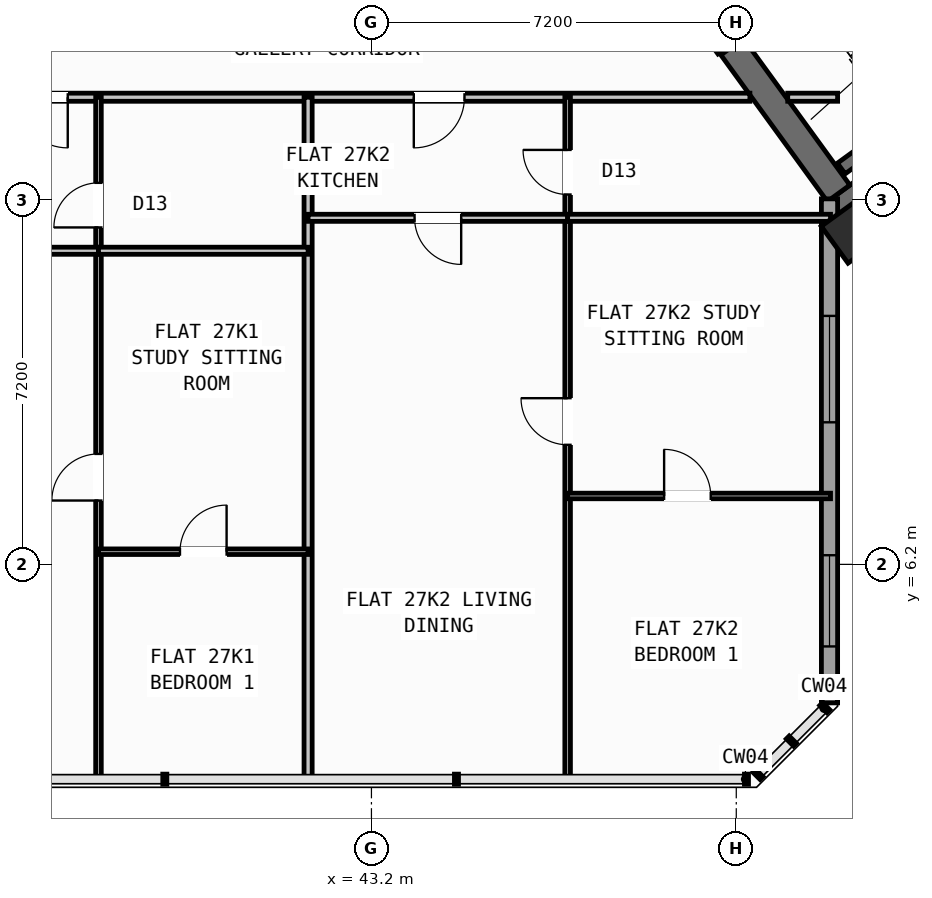
"""IFC4 building model, lengths in metres.
Left out: names, types, materials, properties, quantities, classifications, styles, units other than length and angle.
Written with IfcOpenShell. Run it as: python <this file> out.ifc"""

import sys

from ifc_helpers import new_model, si_unit, direction, frame, frame_2d, origin, origin_2d, place, context, subcontext, project, spatial, rectangle, hollow_rectangle, extrude, source, transform, mapped, element, fill, save


model = new_model("IFC4")
c1 = context("Model", 3, precision=1e-05, world=origin(), true_north=direction((0.0, 1.0)))
c2 = subcontext(c1, "Body", "Model", "MODEL_VIEW")
j1 = project(units=[si_unit("LENGTHUNIT", "METRE"), si_unit("PLANEANGLEUNIT", "RADIAN")], contexts=[c1])
p1 = place(None, origin())
s1 = spatial("IfcSite", under=j1, at=p1, CompositionType="ELEMENT")
p2 = place(p1, origin())
s2 = spatial("IfcBuilding", under=s1, at=p2, CompositionType="ELEMENT")
p3 = place(p2, frame((0.0, 0.0, 108.9)))
s3 = spatial("IfcBuildingStorey", under=s2, at=p3, CompositionType="ELEMENT", Elevation=108.9)
p4 = place(p3, frame((36.683, 18.304, 0.0), z_axis=(0.0, 0.0, 1.0), x_axis=(-0.529896466841, -0.848062341122, 0.0)))
e1 = element("IfcWall", 1, at=p4, inside=s3, PredefinedType="SHEAR", context=c2, shape_type="SweptSolid", body=[
    extrude(rectangle(XDim=6.425, YDim=0.55, at=frame_2d((3.212, 0.0))), origin(), (0.0, 0.0, 1.0), 3.35),
])
p5 = place(p3, frame((52.359, 13.14, 0.0), z_axis=(0.0, 0.0, 1.0), x_axis=(0.809014896919, 0.587788139183, 0.0)))
e2 = element("IfcWall", 2, at=p5, inside=s3, PredefinedType="SHEAR", context=c2, shape_type="SweptSolid", body=[
    extrude(rectangle(XDim=12.34, YDim=0.55, at=frame_2d((6.17, 0.0))), origin(), (0.0, 0.0, 1.0), 3.35),
])
p6 = place(p3, frame((52.42, 13.524, 0.0), z_axis=(0.0, 0.0, 1.0), x_axis=(-0.587802113096, 0.809004744015, 0.0)))
e3 = element("IfcWall", 3, at=p6, inside=s3, PredefinedType="SHEAR", context=c2, shape_type="SweptSolid", body=[
    extrude(rectangle(XDim=3.575, YDim=0.55, at=frame_2d((1.788, 0.0))), origin(), (0.0, 0.0, 1.0), 3.35),
])
m1 = source(origin(), c2, "Body", "SweptSolid", [
    extrude(hollow_rectangle(XDim=0.9, YDim=0.9, WallThickness=0.036, at=origin_2d()), origin(), (0.0, 0.0, 1.0), 3.6),
])
p7 = place(p3, frame((52.705, 12.773, 0.0), z_axis=(0.0, 0.0, 1.0), x_axis=(0.809016994375, 0.587785252292, 0.0)))
e4 = element("IfcColumn", 4, at=p7, inside=s3, PredefinedType="COLUMN", context=c2, shape_type="MappedRepresentation", body=[
    mapped(m1, transform((0.0, 0.0, 0.0), scale=1.0)),
])
p8 = place(p3, frame((52.24, 13.414, 0.0), z_axis=(0.0, 0.0, 1.0), x_axis=(0.0, -1.0, 0.0)))
e5 = element("IfcWall", 5, at=p8, inside=s3, PredefinedType="STANDARD", context=c2, shape_type="SweptSolid", body=[
    extrude(rectangle(XDim=9.948, YDim=0.32, at=frame_2d((4.974, 0.0))), origin(), (0.0, 0.0, 1.0), 3.35),
])
p9 = place(p8, frame((2.31, 0.0, 0.8)))
e6 = element("IfcOpeningElement", 6, at=p9, cuts=e5, PredefinedType="OPENING", context=c2, shape_type="SweptSolid", body=[
    extrude(rectangle(XDim=2.1, YDim=1.55, at=frame_2d((1.05, 0.775))), frame((0.0, 0.17, 0.0), z_axis=(0.0, -1.0, 0.0), x_axis=(1.0, 0.0, 0.0)), (0.0, 0.0, 1.0), 0.34),
])
p10 = place(p8, frame((7.033, 0.0, 0.85)))
e7 = element("IfcOpeningElement", 7, at=p10, cuts=e5, PredefinedType="OPENING", context=c2, shape_type="SweptSolid", body=[
    extrude(rectangle(XDim=1.8, YDim=1.5, at=frame_2d((0.9, 0.75))), frame((0.0, 0.17, 0.0), z_axis=(0.0, -1.0, 0.0), x_axis=(1.0, 0.0, 0.0)), (0.0, 0.0, 1.0), 0.34),
])
p11 = place(p3, frame((52.472, 14.013, 0.0), z_axis=(0.0, 0.0, 1.0), x_axis=(0.809028366311, 0.587769599847, 0.0)))
e8 = element("IfcWall", 8, at=p11, inside=s3, PredefinedType="SHEAR", context=c2, shape_type="SweptSolid", body=[
    extrude(rectangle(XDim=7.33, YDim=0.26, at=frame_2d((3.665, 0.0))), origin(), (0.0, 0.0, 1.0), 3.35),
])
p12 = place(p3, frame((35.237, 15.42, 0.0), z_axis=(0.0, 0.0, 1.0), x_axis=(1.0, 0.0, 0.0)))
e9 = element("IfcWall", 9, at=p12, inside=s3, PredefinedType="PARTITIONING", context=c2, shape_type="SweptSolid", body=[
    extrude(rectangle(XDim=15.432, YDim=0.16, at=frame_2d((7.716, 0.0))), origin(), (0.0, 0.0, 1.0), 3.34),
])
p13 = place(p12, frame((0.969, 0.0, 0.0)))
e10 = element("IfcOpeningElement", 10, at=p13, cuts=e9, PredefinedType="OPENING", context=c2, shape_type="SweptSolid", body=[
    extrude(rectangle(XDim=1.0, YDim=2.1, at=frame_2d((0.5, 1.05))), frame((0.0, 0.09, 0.0), z_axis=(0.0, -1.0, 0.0), x_axis=(1.0, 0.0, 0.0)), (0.0, 0.0, 1.0), 0.18),
])
p14 = place(p12, frame((8.799, 0.0, 0.0)))
e11 = element("IfcOpeningElement", 11, at=p14, cuts=e9, PredefinedType="OPENING", context=c2, shape_type="SweptSolid", body=[
    extrude(rectangle(XDim=1.0, YDim=2.1, at=frame_2d((0.5, 1.05))), frame((0.0, 0.09, 0.0), z_axis=(0.0, -1.0, 0.0), x_axis=(1.0, 0.0, 0.0)), (0.0, 0.0, 1.0), 0.18),
])
p15 = place(p3, frame((51.416, 15.42, 0.0), z_axis=(0.0, 0.0, 1.0), x_axis=(1.0, 0.0, 0.0)))
e12 = element("IfcWall", 12, at=p15, inside=s3, PredefinedType="PARTITIONING", context=c2, shape_type="SweptSolid", body=[
    extrude(rectangle(XDim=0.984, YDim=0.16, at=frame_2d((0.492, 0.0))), origin(), (0.0, 0.0, 1.0), 3.34),
])
p16 = place(p3, frame((50.119, 16.333, 0.0), z_axis=(0.0, 0.0, 1.0), x_axis=(-0.587749856981, 0.809042709391, 0.0)))
e13 = element("IfcWall", 13, at=p16, inside=s3, PredefinedType="STANDARD", context=c2, shape_type="SweptSolid", body=[
    extrude(rectangle(XDim=2.96, YDim=0.2, at=frame_2d((1.48, 0.0))), origin(), (0.0, 0.0, 1.0), 3.34),
])
p17 = place(p16, frame((0.53, 0.0, 0.0)))
e14 = element("IfcOpeningElement", 14, at=p17, cuts=e13, PredefinedType="OPENING", context=c2, shape_type="SweptSolid", body=[
    extrude(rectangle(XDim=1.5, YDim=2.15, at=frame_2d((0.75, 1.075))), frame((0.0, 0.11, 0.0), z_axis=(0.0, -1.0, 0.0), x_axis=(1.0, 0.0, 0.0)), (0.0, 0.0, 1.0), 0.22),
])
p18 = place(p3, frame((41.95, 1.96, 0.0), z_axis=(0.0, 0.0, 1.0), x_axis=(0.0, 1.0, 0.0)))
e15 = element("IfcWall", 15, at=p18, inside=s3, PredefinedType="PARTITIONING", context=c2, shape_type="SweptSolid", body=[
    extrude(rectangle(XDim=13.46, YDim=0.16, at=frame_2d((6.73, 0.0))), origin(), (0.0, 0.0, 1.0), 3.34),
])
p19 = place(p3, frame((37.813, 1.96, 0.0), z_axis=(0.0, 0.0, 1.0), x_axis=(0.0, 1.0, 0.0)))
e16 = element("IfcWall", 16, at=p19, inside=s3, PredefinedType="PARTITIONING", context=c2, shape_type="SweptSolid", body=[
    extrude(rectangle(XDim=13.46, YDim=0.11, at=frame_2d((6.73, 0.0))), origin(), (0.0, 0.0, 1.0), 3.34),
])
p20 = place(p19, frame((5.5, 0.0, 0.0)))
e17 = element("IfcOpeningElement", 17, at=p20, cuts=e16, PredefinedType="OPENING", context=c2, shape_type="SweptSolid", body=[
    extrude(rectangle(XDim=0.92, YDim=2.08, at=frame_2d((0.46, 1.04))), frame((0.0, 0.065, 0.0), z_axis=(0.0, -1.0, 0.0), x_axis=(1.0, 0.0, 0.0)), (0.0, 0.0, 1.0), 0.13),
])
p21 = place(p19, frame((10.89, 0.0, 0.0)))
e18 = element("IfcOpeningElement", 18, at=p21, cuts=e16, PredefinedType="OPENING", context=c2, shape_type="SweptSolid", body=[
    extrude(rectangle(XDim=0.88, YDim=2.08, at=frame_2d((0.44, 1.04))), frame((0.0, 0.065, 0.0), z_axis=(0.0, -1.0, 0.0), x_axis=(1.0, 0.0, 0.0)), (0.0, 0.0, 1.0), 0.13),
])
p22 = place(p3, frame((33.433, 12.39, 0.0), z_axis=(0.0, 0.0, 1.0), x_axis=(1.0, 0.0, 0.0)))
e19 = element("IfcWall", 19, at=p22, inside=s3, PredefinedType="PLUMBINGWALL", context=c2, shape_type="SweptSolid", body=[
    extrude(rectangle(XDim=4.38, YDim=0.14, at=frame_2d((2.19, 0.0))), origin(), (0.0, 0.0, 1.0), 2.525),
])
p23 = place(p22, frame((1.064, 0.0, 0.0)))
e20 = element("IfcOpeningElement", 20, at=p23, cuts=e19, PredefinedType="OPENING", context=c2, shape_type="SweptSolid", body=[
    extrude(rectangle(XDim=0.92, YDim=2.08, at=frame_2d((0.46, 1.04))), frame((0.0, 0.08, 0.0), z_axis=(0.0, -1.0, 0.0), x_axis=(1.0, 0.0, 0.0)), (0.0, 0.0, 1.0), 0.16),
])
p24 = place(p3, frame((37.813, 12.39, 0.0), z_axis=(0.0, 0.0, 1.0), x_axis=(1.0, 0.0, 0.0)))
e21 = element("IfcWall", 21, at=p24, inside=s3, PredefinedType="PLUMBINGWALL", context=c2, shape_type="SweptSolid", body=[
    extrude(rectangle(XDim=4.137, YDim=0.14, at=frame_2d((2.068, 0.0))), origin(), (0.0, 0.0, 1.0), 2.525),
])
p25 = place(p3, frame((37.813, 6.45, 0.0), z_axis=(0.0, 0.0, 1.0), x_axis=(1.0, 0.0, 0.0)))
e22 = element("IfcWall", 22, at=p25, inside=s3, PredefinedType="PARTITIONING", context=c2, shape_type="SweptSolid", body=[
    extrude(rectangle(XDim=4.137, YDim=0.11, at=frame_2d((2.068, 0.0))), origin(), (0.0, 0.0, 1.0), 3.34),
])
p26 = place(p25, frame((1.608, 0.0, 0.0)))
e23 = element("IfcOpeningElement", 23, at=p26, cuts=e22, PredefinedType="OPENING", context=c2, shape_type="SweptSolid", body=[
    extrude(rectangle(XDim=0.92, YDim=2.08, at=frame_2d((0.46, 1.04))), frame((0.0, 0.065, 0.0), z_axis=(0.0, -1.0, 0.0), x_axis=(1.0, 0.0, 0.0)), (0.0, 0.0, 1.0), 0.13),
])
p27 = place(p3, frame((47.072, 1.96, 0.0), z_axis=(0.0, 0.0, 1.0), x_axis=(0.0, 1.0, 0.0)))
e24 = element("IfcWall", 24, at=p27, inside=s3, PredefinedType="PARTITIONING", context=c2, shape_type="SweptSolid", body=[
    extrude(rectangle(XDim=13.46, YDim=0.11, at=frame_2d((6.73, 0.0))), origin(), (0.0, 0.0, 1.0), 3.34),
])
p28 = place(p27, frame((6.6, 0.0, 0.0)))
e25 = element("IfcOpeningElement", 25, at=p28, cuts=e24, PredefinedType="OPENING", context=c2, shape_type="SweptSolid", body=[
    extrude(rectangle(XDim=0.92, YDim=2.08, at=frame_2d((0.46, 1.04))), frame((0.0, 0.065, 0.0), z_axis=(0.0, -1.0, 0.0), x_axis=(1.0, 0.0, 0.0)), (0.0, 0.0, 1.0), 0.13),
])
p29 = place(p27, frame((11.54, 0.0, 0.0)))
e26 = element("IfcOpeningElement", 26, at=p29, cuts=e24, PredefinedType="OPENING", context=c2, shape_type="SweptSolid", body=[
    extrude(rectangle(XDim=0.88, YDim=2.08, at=frame_2d((0.44, 1.04))), frame((0.0, 0.065, 0.0), z_axis=(0.0, -1.0, 0.0), x_axis=(1.0, 0.0, 0.0)), (0.0, 0.0, 1.0), 0.13),
])
p30 = place(p3, frame((41.95, 13.04, 0.0), z_axis=(0.0, 0.0, 1.0), x_axis=(1.0, 0.0, 0.0)))
e27 = element("IfcWall", 27, at=p30, inside=s3, PredefinedType="PLUMBINGWALL", context=c2, shape_type="SweptSolid", body=[
    extrude(rectangle(XDim=5.122, YDim=0.14, at=frame_2d((2.561, 0.0))), origin(), (0.0, 0.0, 1.0), 3.34),
])
p31 = place(p30, frame((2.101, 0.0, 0.0)))
e28 = element("IfcOpeningElement", 28, at=p31, cuts=e27, PredefinedType="OPENING", context=c2, shape_type="SweptSolid", body=[
    extrude(rectangle(XDim=0.92, YDim=2.08, at=frame_2d((0.46, 1.04))), frame((0.0, 0.08, 0.0), z_axis=(0.0, -1.0, 0.0), x_axis=(1.0, 0.0, 0.0)), (0.0, 0.0, 1.0), 0.16),
])
p32 = place(p3, frame((47.072, 13.04, 0.0), z_axis=(0.0, 0.0, 1.0), x_axis=(1.0, 0.0, 0.0)))
e29 = element("IfcWall", 29, at=p32, inside=s3, PredefinedType="PLUMBINGWALL", context=c2, shape_type="SweptSolid", body=[
    extrude(rectangle(XDim=5.188, YDim=0.14, at=frame_2d((2.594, 0.0))), origin(), (0.0, 0.0, 1.0), 2.525),
])
p33 = place(p3, frame((47.072, 7.55, 0.0), z_axis=(0.0, 0.0, 1.0), x_axis=(1.0, 0.0, 0.0)))
e30 = element("IfcWall", 30, at=p33, inside=s3, PredefinedType="PARTITIONING", context=c2, shape_type="SweptSolid", body=[
    extrude(rectangle(XDim=5.188, YDim=0.11, at=frame_2d((2.594, 0.0))), origin(), (0.0, 0.0, 1.0), 3.34),
])
p34 = place(p33, frame((1.904, 0.0, 0.0)))
e31 = element("IfcOpeningElement", 31, at=p34, cuts=e30, PredefinedType="OPENING", context=c2, shape_type="SweptSolid", body=[
    extrude(rectangle(XDim=0.92, YDim=2.08, at=frame_2d((0.46, 1.04))), frame((0.0, 0.065, 0.0), z_axis=(0.0, -1.0, 0.0), x_axis=(1.0, 0.0, 0.0)), (0.0, 0.0, 1.0), 0.13),
])
m2 = source(origin(), c2, "Body", "SweptSolid", [
    extrude(rectangle(XDim=2.1, YDim=1.55, at=frame_2d((1.05, 0.775))), frame((0.0, 0.03, 0.0), z_axis=(0.0, -1.0, 0.0), x_axis=(1.0, 0.0, 0.0)), (0.0, 0.0, 1.0), 0.06),
])
p35 = place(p9, origin())
e32 = element("IfcWindow", 32, at=p35, inside=s3, PartitioningType="SINGLE_PANEL", PredefinedType="WINDOW", context=c2, shape_type="MappedRepresentation", body=[
    mapped(m2, transform((0.0, 0.0, 0.0), scale=1.0)),
])
fill(e6, e32)
m3 = source(origin(), c2, "Body", "SweptSolid", [
    extrude(rectangle(XDim=1.8, YDim=1.5, at=frame_2d((0.9, 0.75))), frame((0.0, 0.03, 0.0), z_axis=(0.0, -1.0, 0.0), x_axis=(1.0, 0.0, 0.0)), (0.0, 0.0, 1.0), 0.06),
])
p36 = place(p10, origin())
e33 = element("IfcWindow", 33, at=p36, inside=s3, PartitioningType="SINGLE_PANEL", PredefinedType="WINDOW", context=c2, shape_type="MappedRepresentation", body=[
    mapped(m3, transform((0.0, 0.0, 0.0), scale=1.0)),
])
fill(e7, e33)
m4 = source(origin(), c2, "Body", "SweptSolid", [
    extrude(rectangle(XDim=0.92, YDim=2.08, at=frame_2d((0.46, 1.04))), frame((0.0, 0.025, 0.0), z_axis=(0.0, -1.0, 0.0), x_axis=(1.0, 0.0, 0.0)), (0.0, 0.0, 1.0), 0.05),
])
p37 = place(p20, origin())
e34 = element("IfcDoor", 34, at=p37, inside=s3, OperationType="SINGLE_SWING_LEFT", PredefinedType="DOOR", context=c2, shape_type="MappedRepresentation", body=[
    mapped(m4, transform((0.0, 0.0, 0.0), scale=1.0)),
])
fill(e17, e34)
p38 = place(p26, origin())
e35 = element("IfcDoor", 35, at=p38, inside=s3, OperationType="SINGLE_SWING_RIGHT", PredefinedType="DOOR", context=c2, shape_type="MappedRepresentation", body=[
    mapped(m4, transform((0.0, 0.0, 0.0), scale=1.0)),
])
fill(e23, e35)
m5 = source(origin(), c2, "Body", "SweptSolid", [
    extrude(rectangle(XDim=1.0, YDim=2.1, at=frame_2d((0.5, 1.05))), frame((0.0, 0.025, 0.0), z_axis=(0.0, -1.0, 0.0), x_axis=(1.0, 0.0, 0.0)), (0.0, 0.0, 1.0), 0.05),
])
p39 = place(p13, frame((1.0, 0.0, 0.0), z_axis=(0.0, 0.0, 1.0), x_axis=(-1.0, 0.0, 0.0)))
e36 = element("IfcDoor", 36, at=p39, inside=s3, OperationType="SINGLE_SWING_LEFT", PredefinedType="DOOR", context=c2, shape_type="MappedRepresentation", body=[
    mapped(m5, transform((0.0, 0.0, 0.0), scale=1.0)),
])
fill(e10, e36)
m6 = source(origin(), c2, "Body", "SweptSolid", [
    extrude(rectangle(XDim=0.88, YDim=2.08, at=frame_2d((0.44, 1.04))), frame((0.0, 0.025, 0.0), z_axis=(0.0, -1.0, 0.0), x_axis=(1.0, 0.0, 0.0)), (0.0, 0.0, 1.0), 0.05),
])
p40 = place(p21, origin())
e37 = element("IfcDoor", 37, at=p40, inside=s3, OperationType="SINGLE_SWING_LEFT", PredefinedType="DOOR", context=c2, shape_type="MappedRepresentation", body=[
    mapped(m6, transform((0.0, 0.0, 0.0), scale=1.0)),
])
fill(e18, e37)
p41 = place(p28, origin())
e38 = element("IfcDoor", 38, at=p41, inside=s3, OperationType="SINGLE_SWING_RIGHT", PredefinedType="DOOR", context=c2, shape_type="MappedRepresentation", body=[
    mapped(m4, transform((0.0, 0.0, 0.0), scale=1.0)),
])
fill(e25, e38)
p42 = place(p34, origin())
e39 = element("IfcDoor", 39, at=p42, inside=s3, OperationType="SINGLE_SWING_LEFT", PredefinedType="DOOR", context=c2, shape_type="MappedRepresentation", body=[
    mapped(m4, transform((0.0, 0.0, 0.0), scale=1.0)),
])
fill(e31, e39)
p43 = place(p14, frame((1.0, 0.0, 0.0), z_axis=(0.0, 0.0, 1.0), x_axis=(-1.0, 0.0, 0.0)))
e40 = element("IfcDoor", 40, at=p43, inside=s3, OperationType="SINGLE_SWING_RIGHT", PredefinedType="DOOR", context=c2, shape_type="MappedRepresentation", body=[
    mapped(m5, transform((0.0, 0.0, 0.0), scale=1.0)),
])
fill(e11, e40)
p44 = place(p31, frame((0.92, 0.0, 0.0), z_axis=(0.0, 0.0, 1.0), x_axis=(-1.0, 0.0, 0.0)))
e41 = element("IfcDoor", 41, at=p44, inside=s3, OperationType="SINGLE_SWING_LEFT", PredefinedType="DOOR", context=c2, shape_type="MappedRepresentation", body=[
    mapped(m4, transform((0.0, 0.0, 0.0), scale=1.0)),
])
fill(e28, e41)
p45 = place(p29, origin())
e42 = element("IfcDoor", 42, at=p45, inside=s3, OperationType="SINGLE_SWING_RIGHT", PredefinedType="DOOR", context=c2, shape_type="MappedRepresentation", body=[
    mapped(m6, transform((0.0, 0.0, 0.0), scale=1.0)),
])
fill(e26, e42)
save(model, sys.argv[1])
